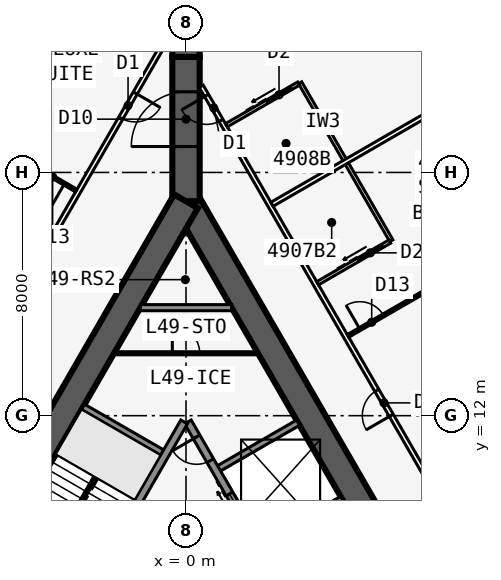
"""IFC4 building model, lengths in metres.
Left out: names, types, materials, properties, quantities, classifications, styles, units other than length and angle.
Written with IfcOpenShell. Run it as: python <this file> out.ifc"""

import sys

from ifc_helpers import new_model, si_unit, direction, frame, frame_2d, origin, place, context, subcontext, project, spatial, rectangle, extrude, element, fill, save


model = new_model("IFC4")
c1 = context("Model", 3, precision=1e-05, world=origin(), true_north=direction((0.0, 1.0)))
c2 = subcontext(c1, "Body", "Model", "MODEL_VIEW")
j1 = project(units=[si_unit("LENGTHUNIT", "METRE"), si_unit("PLANEANGLEUNIT", "RADIAN")], contexts=[c1])
p1 = place(None, origin())
s1 = spatial("IfcSite", under=j1, at=p1, CompositionType="ELEMENT")
p2 = place(p1, origin())
s2 = spatial("IfcBuilding", under=s1, at=p2, CompositionType="ELEMENT")
p3 = place(p2, frame((0.0, 0.0, 182.7)))
s3 = spatial("IfcBuildingStorey", under=s2, at=p3, CompositionType="ELEMENT", Elevation=182.7)
p4 = place(p3, frame((16.5, -9.526, 0.0), z_axis=(0.0, 0.0, 1.0), x_axis=(-0.499999749417, 0.866025548458, 0.0)))
e1 = element("IfcWall", 1, at=p4, inside=s3, PredefinedType="SHEAR", context=c2, shape_type="SweptSolid", body=[
    extrude(rectangle(XDim=33.0, YDim=0.9, at=frame_2d((16.5, 0.0))), origin(), (0.0, 0.0, 1.0), 3.4),
])
p5 = place(p4, frame((14.15, 0.0, 0.0)))
e2 = element("IfcOpeningElement", 2, at=p5, cuts=e1, PredefinedType="OPENING", context=c2, shape_type="SweptSolid", body=[
    extrude(rectangle(XDim=1.8, YDim=2.13, at=frame_2d((0.9, 1.065))), frame((0.0, 0.46, 0.0), z_axis=(0.0, -1.0, 0.0), x_axis=(1.0, 0.0, 0.0)), (0.0, 0.0, 1.0), 0.92),
])
p6 = place(p4, frame((12.6, 0.0, 0.0)))
e3 = element("IfcOpeningElement", 3, at=p6, cuts=e1, PredefinedType="OPENING", context=c2, shape_type="SweptSolid", body=[
    extrude(rectangle(XDim=1.0, YDim=2.13, at=frame_2d((0.5, 1.065))), frame((0.0, 0.46, 0.0), z_axis=(0.0, -1.0, 0.0), x_axis=(1.0, 0.0, 0.0)), (0.0, 0.0, 1.0), 0.92),
])
p7 = place(p3, frame((5.379, 2.586, 0.0), z_axis=(0.0, 0.0, 1.0), x_axis=(-0.500001375892, 0.866024609411, 0.0)))
e4 = element("IfcWall", 4, at=p7, inside=s3, PredefinedType="SOLIDWALL", context=c2, shape_type="SweptSolid", body=[
    extrude(rectangle(XDim=10.633, YDim=0.25, at=frame_2d((5.316, 0.0))), origin(), (0.0, 0.0, 1.0), 3.235),
])
p8 = place(p7, frame((9.164, 0.0, 0.0)))
e5 = element("IfcOpeningElement", 5, at=p8, cuts=e4, PredefinedType="OPENING", context=c2, shape_type="SweptSolid", body=[
    extrude(rectangle(XDim=0.9, YDim=2.13, at=frame_2d((0.45, 1.065))), frame((0.0, 0.135, 0.0), z_axis=(0.0, -1.0, 0.0), x_axis=(1.0, 0.0, 0.0)), (0.0, 0.0, 1.0), 0.27),
])
p9 = place(p7, frame((1.0, 0.0, 0.0)))
e6 = element("IfcOpeningElement", 6, at=p9, cuts=e4, PredefinedType="OPENING", context=c2, shape_type="SweptSolid", body=[
    extrude(rectangle(XDim=1.1, YDim=2.13, at=frame_2d((0.55, 1.065))), frame((0.0, 0.135, 0.0), z_axis=(0.0, -1.0, 0.0), x_axis=(1.0, 0.0, 0.0)), (0.0, 0.0, 1.0), 0.27),
])
p10 = place(p7, frame((3.9, 0.0, 0.0)))
e7 = element("IfcOpeningElement", 7, at=p10, cuts=e4, PredefinedType="OPENING", context=c2, shape_type="SweptSolid", body=[
    extrude(rectangle(XDim=1.1, YDim=2.13, at=frame_2d((0.55, 1.065))), frame((0.0, 0.135, 0.0), z_axis=(0.0, -1.0, 0.0), x_axis=(1.0, 0.0, 0.0)), (0.0, 0.0, 1.0), 0.27),
])
p11 = place(p7, frame((6.8, 0.0, 0.0)))
e8 = element("IfcOpeningElement", 8, at=p11, cuts=e4, PredefinedType="OPENING", context=c2, shape_type="SweptSolid", body=[
    extrude(rectangle(XDim=1.1, YDim=2.13, at=frame_2d((0.55, 1.065))), frame((0.0, 0.135, 0.0), z_axis=(0.0, -1.0, 0.0), x_axis=(1.0, 0.0, 0.0)), (0.0, 0.0, 1.0), 0.27),
])
for number, where, z_axis, x_axis in (
    (9, (2.429, 7.696, 0.0), (0.0, 0.0, 1.0), (0.866, 0.5, 0.0)),
    (10, (0.979, 10.207, 0.0), (0.0, 0.0, 1.0), (0.866, 0.5, 0.0)),
):
    element("IfcWall", number, at=place(p3, frame(where, z_axis=z_axis, x_axis=x_axis)), inside=s3, PredefinedType="SOLIDWALL", context=c2, shape_type="SweptSolid", body=[
        extrude(rectangle(XDim=3.125, YDim=0.2, at=frame_2d((1.562, 0.0))), origin(), (0.0, 0.0, 1.0), 3.235),
    ])
p12 = place(p3, frame((0.0, 19.052, 0.0), z_axis=(0.0, 0.0, 1.0), x_axis=(-0.499999749417, -0.866025548458, 0.0)))
e11 = element("IfcWall", 11, at=p12, inside=s3, PredefinedType="SHEAR", context=c2, shape_type="SweptSolid", body=[
    extrude(rectangle(XDim=33.0, YDim=0.9, at=frame_2d((16.5, 0.0))), origin(), (0.0, 0.0, 1.0), 3.4),
])
p13 = place(p12, frame((14.15, 0.0, 0.0)))
e12 = element("IfcOpeningElement", 12, at=p13, cuts=e11, PredefinedType="OPENING", context=c2, shape_type="SweptSolid", body=[
    extrude(rectangle(XDim=1.8, YDim=2.13, at=frame_2d((0.9, 1.065))), frame((0.0, 0.46, 0.0), z_axis=(0.0, -1.0, 0.0), x_axis=(1.0, 0.0, 0.0)), (0.0, 0.0, 1.0), 0.92),
])
p14 = place(p12, frame((12.6, 0.0, 0.0)))
e13 = element("IfcOpeningElement", 13, at=p14, cuts=e11, PredefinedType="OPENING", context=c2, shape_type="SweptSolid", body=[
    extrude(rectangle(XDim=1.0, YDim=2.13, at=frame_2d((0.5, 1.065))), frame((0.0, 0.46, 0.0), z_axis=(0.0, -1.0, 0.0), x_axis=(1.0, 0.0, 0.0)), (0.0, 0.0, 1.0), 0.92),
])
p15 = place(p3, frame((-0.062, 11.794, 0.0), z_axis=(0.0, 0.0, 1.0), x_axis=(-0.500006680225, -0.86602154692, 0.0)))
e14 = element("IfcWall", 14, at=p15, inside=s3, PredefinedType="SOLIDWALL", context=c2, shape_type="SweptSolid", body=[
    extrude(rectangle(XDim=7.733, YDim=0.25, at=frame_2d((3.866, 0.0))), origin(), (0.0, 0.0, 1.0), 3.235),
])
p16 = place(p3, frame((-0.679, 10.727, 0.0), z_axis=(0.0, 0.0, 1.0), x_axis=(-0.866022959057, 0.500004234368, 0.0)))
e15 = element("IfcWall", 15, at=p16, inside=s3, PredefinedType="SOLIDWALL", context=c2, shape_type="SweptSolid", body=[
    extrude(rectangle(XDim=3.125, YDim=0.2, at=frame_2d((1.562, 0.0))), origin(), (0.0, 0.0, 1.0), 3.235),
])
p17 = place(p3, frame((0.0, 19.052, 0.0), z_axis=(0.0, 0.0, 1.0), x_axis=(0.0, 1.0, 0.0)))
e16 = element("IfcWall", 16, at=p17, inside=s3, PredefinedType="SHEAR", context=c2, shape_type="SweptSolid", body=[
    extrude(rectangle(XDim=4.746, YDim=0.9, at=frame_2d((2.373, 0.0))), origin(), (0.0, 0.0, 1.0), 3.4),
])
p18 = place(p17, frame((1.8, 0.0, 0.0)))
e17 = element("IfcOpeningElement", 17, at=p18, cuts=e16, PredefinedType="OPENING", context=c2, shape_type="SweptSolid", body=[
    extrude(rectangle(XDim=1.8, YDim=2.13, at=frame_2d((0.9, 1.065))), frame((0.0, 0.46, 0.0), z_axis=(0.0, -1.0, 0.0), x_axis=(1.0, 0.0, 0.0)), (0.0, 0.0, 1.0), 0.92),
])
p19 = place(p3, frame((0.0, 23.799, 0.0), z_axis=(0.0, 0.0, 1.0), x_axis=(0.0, 1.0, 0.0)))
e18 = element("IfcWall", 18, at=p19, inside=s3, PredefinedType="SHEAR", context=c2, shape_type="SweptSolid", body=[
    extrude(rectangle(XDim=1.155, YDim=0.9, at=frame_2d((0.577, 0.0))), origin(), (0.0, 0.0, 1.0), 3.4),
])
p20 = place(p3, frame((9.471, 22.754, 0.0), z_axis=(0.0, 0.0, 1.0), x_axis=(-0.691719937936, 0.722165858693, 0.0)))
e19 = element("IfcWall", 19, at=p20, inside=s3, PredefinedType="STANDARD", context=c2, shape_type="SweptSolid", body=[
    extrude(rectangle(XDim=5.148, YDim=0.25, at=frame_2d((2.574, 0.0))), origin(), (0.0, 0.0, 1.0), 3.235),
])
p21 = place(p20, frame((0.774, 0.0, 0.45)))
e20 = element("IfcOpeningElement", 20, at=p21, cuts=e19, PredefinedType="OPENING", context=c2, shape_type="SweptSolid", body=[
    extrude(rectangle(XDim=3.6, YDim=2.4, at=frame_2d((1.8, 1.2))), frame((0.0, 0.135, 0.0), z_axis=(0.0, -1.0, 0.0), x_axis=(1.0, 0.0, 0.0)), (0.0, 0.0, 1.0), 0.27),
])
p22 = place(p3, frame((20.027, -10.985, 0.0), z_axis=(0.0, 0.0, 1.0), x_axis=(-0.500001677587, 0.866024435227, 0.0)))
e21 = element("IfcWall", 21, at=p22, inside=s3, PredefinedType="PARTITIONING", context=c2, shape_type="SweptSolid", body=[
    extrude(rectangle(XDim=39.054, YDim=0.15, at=frame_2d((19.527, 0.0))), origin(), (0.0, 0.0, 1.0), 3.235),
])
p23 = place(p22, frame((1.558, 0.0, 0.0)))
e22 = element("IfcOpeningElement", 22, at=p23, cuts=e21, PredefinedType="OPENING", context=c2, shape_type="SweptSolid", body=[
    extrude(rectangle(XDim=0.95, YDim=2.13, at=frame_2d((0.475, 1.065))), frame((0.0, 0.085, 0.0), z_axis=(0.0, -1.0, 0.0), x_axis=(1.0, 0.0, 0.0)), (0.0, 0.0, 1.0), 0.17),
])
p24 = place(p22, frame((12.752, 0.0, 0.0)))
e23 = element("IfcOpeningElement", 23, at=p24, cuts=e21, PredefinedType="OPENING", context=c2, shape_type="SweptSolid", body=[
    extrude(rectangle(XDim=0.95, YDim=2.13, at=frame_2d((0.475, 1.065))), frame((0.0, 0.085, 0.0), z_axis=(0.0, -1.0, 0.0), x_axis=(1.0, 0.0, 0.0)), (0.0, 0.0, 1.0), 0.17),
])
p25 = place(p22, frame((26.552, 0.0, 0.0)))
e24 = element("IfcOpeningElement", 24, at=p25, cuts=e21, PredefinedType="OPENING", context=c2, shape_type="SweptSolid", body=[
    extrude(rectangle(XDim=0.95, YDim=2.13, at=frame_2d((0.475, 1.065))), frame((0.0, 0.085, 0.0), z_axis=(0.0, -1.0, 0.0), x_axis=(1.0, 0.0, 0.0)), (0.0, 0.0, 1.0), 0.17),
])
p26 = place(p22, frame((37.752, 0.0, 0.0)))
e25 = element("IfcOpeningElement", 25, at=p26, cuts=e21, PredefinedType="OPENING", context=c2, shape_type="SweptSolid", body=[
    extrude(rectangle(XDim=0.95, YDim=2.13, at=frame_2d((0.475, 1.065))), frame((0.0, 0.085, 0.0), z_axis=(0.0, -1.0, 0.0), x_axis=(1.0, 0.0, 0.0)), (0.0, 0.0, 1.0), 0.17),
])
p27 = place(p3, frame((5.329, 14.623, 0.0), z_axis=(0.0, 0.0, 1.0), x_axis=(0.866011723728, 0.500023693804, 0.0)))
e26 = element("IfcWall", 26, at=p27, inside=s3, PredefinedType="PARTITIONING", context=c2, shape_type="SweptSolid", body=[
    extrude(rectangle(XDim=8.395, YDim=0.1, at=frame_2d((4.198, 0.0))), origin(), (0.0, 0.0, 1.0), 2.389),
])
p28 = place(p27, frame((0.45, 0.0, 0.0)))
e27 = element("IfcOpeningElement", 27, at=p28, cuts=e26, PredefinedType="OPENING", context=c2, shape_type="SweptSolid", body=[
    extrude(rectangle(XDim=0.9, YDim=2.13, at=frame_2d((0.45, 1.065))), frame((0.0, 0.06, 0.0), z_axis=(0.0, -1.0, 0.0), x_axis=(1.0, 0.0, 0.0)), (0.0, 0.0, 1.0), 0.12),
])
p29 = place(p3, frame((2.829, 18.954, 0.0), z_axis=(0.0, 0.0, 1.0), x_axis=(0.866015739374, 0.500016738876, 0.0)))
e28 = element("IfcWall", 28, at=p29, inside=s3, PredefinedType="PARTITIONING", context=c2, shape_type="SweptSolid", body=[
    extrude(rectangle(XDim=7.516, YDim=0.15, at=frame_2d((3.758, 0.0))), origin(), (0.0, 0.0, 1.0), 2.389),
])
p30 = place(p3, frame((6.753, 17.755, 0.0), z_axis=(0.0, 0.0, 1.0), x_axis=(-0.499990139034, 0.866031096941, 0.0)))
e29 = element("IfcWall", 29, at=p30, inside=s3, PredefinedType="PLUMBINGWALL", context=c2, shape_type="SweptSolid", body=[
    extrude(rectangle(XDim=3.0, YDim=0.12, at=frame_2d((1.5, 0.0))), origin(), (0.0, 0.0, 1.0), 3.235),
])
p31 = place(p3, frame((4.329, 16.355, 0.0), z_axis=(0.0, 0.0, 1.0), x_axis=(0.866035715982, 0.499982138324, 0.0)))
e30 = element("IfcWall", 30, at=p31, inside=s3, PredefinedType="PLUMBINGWALL", context=c2, shape_type="SweptSolid", body=[
    extrude(rectangle(XDim=2.74, YDim=0.12, at=frame_2d((1.37, 0.0))), origin(), (0.0, 0.0, 1.0), 3.235),
])
p32 = place(p31, frame((1.55, 0.0, 0.0)))
e31 = element("IfcOpeningElement", 31, at=p32, cuts=e30, PredefinedType="OPENING", context=c2, shape_type="SweptSolid", body=[
    extrude(rectangle(XDim=0.9, YDim=2.13, at=frame_2d((0.45, 1.065))), frame((0.0, 0.07, 0.0), z_axis=(0.0, -1.0, 0.0), x_axis=(1.0, 0.0, 0.0)), (0.0, 0.0, 1.0), 0.14),
])
p33 = place(p3, frame((5.253, 20.354, 0.0), z_axis=(0.0, 0.0, 1.0), x_axis=(-0.499990139034, 0.866031096941, 0.0)))
e32 = element("IfcWall", 32, at=p33, inside=s3, PredefinedType="PLUMBINGWALL", context=c2, shape_type="SweptSolid", body=[
    extrude(rectangle(XDim=3.0, YDim=0.12, at=frame_2d((1.5, 0.0))), origin(), (0.0, 0.0, 1.0), 3.235),
])
p34 = place(p3, frame((1.329, 21.552, 0.0), z_axis=(0.0, 0.0, 1.0), x_axis=(0.865997131366, 0.500048966069, 0.0)))
e33 = element("IfcWall", 33, at=p34, inside=s3, PredefinedType="PLUMBINGWALL", context=c2, shape_type="SweptSolid", body=[
    extrude(rectangle(XDim=2.74, YDim=0.12, at=frame_2d((1.37, 0.0))), origin(), (0.0, 0.0, 1.0), 3.235),
])
p35 = place(p34, frame((1.55, 0.0, 0.0)))
e34 = element("IfcOpeningElement", 34, at=p35, cuts=e33, PredefinedType="OPENING", context=c2, shape_type="SweptSolid", body=[
    extrude(rectangle(XDim=0.9, YDim=2.13, at=frame_2d((0.45, 1.065))), frame((0.0, 0.07, 0.0), z_axis=(0.0, -1.0, 0.0), x_axis=(1.0, 0.0, 0.0)), (0.0, 0.0, 1.0), 0.14),
])
p36 = place(p3, frame((-0.5, 24.636, 0.0), z_axis=(0.0, 0.0, 1.0), x_axis=(-0.500001915564, -0.86602429783, 0.0)))
e35 = element("IfcWall", 35, at=p36, inside=s3, PredefinedType="PARTITIONING", context=c2, shape_type="SweptSolid", body=[
    extrude(rectangle(XDim=42.172, YDim=0.15, at=frame_2d((21.086, 0.0))), origin(), (0.0, 0.0, 1.0), 3.235),
])
p37 = place(p36, frame((2.338, 0.0, 0.0)))
e36 = element("IfcOpeningElement", 36, at=p37, cuts=e35, PredefinedType="OPENING", context=c2, shape_type="SweptSolid", body=[
    extrude(rectangle(XDim=0.95, YDim=2.13, at=frame_2d((0.475, 1.065))), frame((0.0, 0.085, 0.0), z_axis=(0.0, -1.0, 0.0), x_axis=(1.0, 0.0, 0.0)), (0.0, 0.0, 1.0), 0.17),
])
p38 = place(p36, frame((18.111, 0.0, 0.0)))
e37 = element("IfcOpeningElement", 37, at=p38, cuts=e35, PredefinedType="OPENING", context=c2, shape_type="SweptSolid", body=[
    extrude(rectangle(XDim=0.95, YDim=2.13, at=frame_2d((0.475, 1.065))), frame((0.0, 0.085, 0.0), z_axis=(0.0, -1.0, 0.0), x_axis=(1.0, 0.0, 0.0)), (0.0, 0.0, 1.0), 0.17),
])
p39 = place(p36, frame((28.111, 0.0, 0.0)))
e38 = element("IfcOpeningElement", 38, at=p39, cuts=e35, PredefinedType="OPENING", context=c2, shape_type="SweptSolid", body=[
    extrude(rectangle(XDim=0.95, YDim=2.13, at=frame_2d((0.475, 1.065))), frame((0.0, 0.085, 0.0), z_axis=(0.0, -1.0, 0.0), x_axis=(1.0, 0.0, 0.0)), (0.0, 0.0, 1.0), 0.17),
])
p40 = place(p36, frame((39.311, 0.0, 0.0)))
e39 = element("IfcOpeningElement", 39, at=p40, cuts=e35, PredefinedType="OPENING", context=c2, shape_type="SweptSolid", body=[
    extrude(rectangle(XDim=0.95, YDim=2.13, at=frame_2d((0.475, 1.065))), frame((0.0, 0.085, 0.0), z_axis=(0.0, -1.0, 0.0), x_axis=(1.0, 0.0, 0.0)), (0.0, 0.0, 1.0), 0.17),
])
p41 = place(p3, frame((-3.608, 19.404, 0.0), z_axis=(0.0, 0.0, 1.0), x_axis=(-0.866015989873, 0.500016305018, 0.0)))
e40 = element("IfcWall", 40, at=p41, inside=s3, PredefinedType="PARTITIONING", context=c2, shape_type="SweptSolid", body=[
    extrude(rectangle(XDim=6.616, YDim=0.1, at=frame_2d((3.308, 0.0))), origin(), (0.0, 0.0, 1.0), 2.389),
])
p42 = place(p41, frame((0.45, 0.0, 0.0)))
e41 = element("IfcOpeningElement", 41, at=p42, cuts=e40, PredefinedType="OPENING", context=c2, shape_type="SweptSolid", body=[
    extrude(rectangle(XDim=0.9, YDim=2.13, at=frame_2d((0.45, 1.065))), frame((0.0, 0.06, 0.0), z_axis=(0.0, -1.0, 0.0), x_axis=(1.0, 0.0, 0.0)), (0.0, 0.0, 1.0), 0.12),
])
p43 = place(p3, frame((-1.501, 15.552, 0.0), z_axis=(0.0, 0.0, 1.0), x_axis=(1.0, 0.0, 0.0)))
e42 = element("IfcWall", 42, at=p43, inside=s3, PredefinedType="SOLIDWALL", context=c2, shape_type="SweptSolid", body=[
    extrude(rectangle(XDim=3.002, YDim=0.2, at=frame_2d((1.501, 0.0))), origin(), (0.0, 0.0, 1.0), 3.235),
])
p44 = place(p3, frame((-2.367, 14.052, 0.0), z_axis=(0.0, 0.0, 1.0), x_axis=(1.0, 0.0, 0.0)))
e43 = element("IfcWall", 43, at=p44, inside=s3, PredefinedType="PARTITIONING", context=c2, shape_type="SweptSolid", body=[
    extrude(rectangle(XDim=4.734, YDim=0.1, at=frame_2d((2.367, 0.0))), origin(), (0.0, 0.0, 1.0), 3.235),
])
p45 = place(p44, frame((1.917, 0.0, 0.0)))
e44 = element("IfcOpeningElement", 44, at=p45, cuts=e43, PredefinedType="OPENING", context=c2, shape_type="SweptSolid", body=[
    extrude(rectangle(XDim=0.9, YDim=2.13, at=frame_2d((0.45, 1.065))), frame((0.0, 0.06, 0.0), z_axis=(0.0, -1.0, 0.0), x_axis=(1.0, 0.0, 0.0)), (0.0, 0.0, 1.0), 0.12),
])
p46 = place(p3, frame((-2.988, 9.978, 0.0), z_axis=(0.0, 0.0, 1.0), x_axis=(-0.499992232847, -0.866029888106, 0.0)))
e45 = element("IfcWall", 45, at=p46, inside=s3, PredefinedType="SOLIDWALL", context=c2, shape_type="SweptSolid", body=[
    extrude(rectangle(XDim=2.794, YDim=0.1, at=frame_2d((1.397, 0.0))), origin(), (0.0, 0.0, 1.0), 3.4),
])
p47 = place(p21, origin())
e46 = element("IfcWindow", 46, at=p47, inside=s3, PartitioningType="SINGLE_PANEL", PredefinedType="WINDOW", context=c2, shape_type="SweptSolid", body=[
    extrude(rectangle(XDim=3.6, YDim=2.4, at=frame_2d((1.8, 1.2))), frame((0.0, 0.03, 0.0), z_axis=(0.0, -1.0, 0.0), x_axis=(1.0, 0.0, 0.0)), (0.0, 0.0, 1.0), 0.06),
])
fill(e20, e46)
p48 = place(p28, origin())
e47 = element("IfcDoor", 47, at=p48, inside=s3, OperationType="SINGLE_SWING_LEFT", PredefinedType="DOOR", context=c2, shape_type="SweptSolid", body=[
    extrude(rectangle(XDim=0.9, YDim=2.13, at=frame_2d((0.45, 1.065))), frame((0.0, 0.025, 0.0), z_axis=(0.0, -1.0, 0.0), x_axis=(1.0, 0.0, 0.0)), (0.0, 0.0, 1.0), 0.05),
])
fill(e27, e47)
p49 = place(p25, origin())
e48 = element("IfcDoor", 48, at=p49, inside=s3, OperationType="SINGLE_SWING_LEFT", PredefinedType="DOOR", context=c2, shape_type="SweptSolid", body=[
    extrude(rectangle(XDim=0.95, YDim=2.13, at=frame_2d((0.475, 1.065))), frame((0.0, 0.025, 0.0), z_axis=(0.0, -1.0, 0.0), x_axis=(1.0, 0.0, 0.0)), (0.0, 0.0, 1.0), 0.05),
])
fill(e24, e48)
p50 = place(p32, origin())
e49 = element("IfcDoor", 49, at=p50, inside=s3, OperationType="SLIDING_TO_LEFT", PredefinedType="DOOR", context=c2, shape_type="SweptSolid", body=[
    extrude(rectangle(XDim=0.9, YDim=2.13, at=frame_2d((0.45, 1.065))), frame((0.0, 0.025, 0.0), z_axis=(0.0, -1.0, 0.0), x_axis=(1.0, 0.0, 0.0)), (0.0, 0.0, 1.0), 0.05),
])
fill(e31, e49)
p51 = place(p35, origin())
e50 = element("IfcDoor", 50, at=p51, inside=s3, OperationType="SLIDING_TO_LEFT", PredefinedType="DOOR", context=c2, shape_type="SweptSolid", body=[
    extrude(rectangle(XDim=0.9, YDim=2.13, at=frame_2d((0.45, 1.065))), frame((0.0, 0.025, 0.0), z_axis=(0.0, -1.0, 0.0), x_axis=(1.0, 0.0, 0.0)), (0.0, 0.0, 1.0), 0.05),
])
fill(e34, e50)
p52 = place(p26, origin())
e51 = element("IfcDoor", 51, at=p52, inside=s3, OperationType="SINGLE_SWING_RIGHT", PredefinedType="DOOR", context=c2, shape_type="SweptSolid", body=[
    extrude(rectangle(XDim=0.95, YDim=2.13, at=frame_2d((0.475, 1.065))), frame((0.0, 0.025, 0.0), z_axis=(0.0, -1.0, 0.0), x_axis=(1.0, 0.0, 0.0)), (0.0, 0.0, 1.0), 0.05),
])
fill(e25, e51)
p53 = place(p42, origin())
e52 = element("IfcDoor", 52, at=p53, inside=s3, OperationType="SINGLE_SWING_LEFT", PredefinedType="DOOR", context=c2, shape_type="SweptSolid", body=[
    extrude(rectangle(XDim=0.9, YDim=2.13, at=frame_2d((0.45, 1.065))), frame((0.0, 0.025, 0.0), z_axis=(0.0, -1.0, 0.0), x_axis=(1.0, 0.0, 0.0)), (0.0, 0.0, 1.0), 0.05),
])
fill(e41, e52)
p54 = place(p37, origin())
e53 = element("IfcDoor", 53, at=p54, inside=s3, OperationType="SINGLE_SWING_LEFT", PredefinedType="DOOR", context=c2, shape_type="SweptSolid", body=[
    extrude(rectangle(XDim=0.95, YDim=2.13, at=frame_2d((0.475, 1.065))), frame((0.0, 0.025, 0.0), z_axis=(0.0, -1.0, 0.0), x_axis=(1.0, 0.0, 0.0)), (0.0, 0.0, 1.0), 0.05),
])
fill(e36, e53)
p55 = place(p18, origin())
e54 = element("IfcDoor", 54, at=p55, inside=s3, OperationType="DOUBLE_DOOR_DOUBLE_SWING", PredefinedType="DOOR", context=c2, shape_type="SweptSolid", body=[
    extrude(rectangle(XDim=1.8, YDim=2.13, at=frame_2d((0.9, 1.065))), frame((0.0, 0.025, 0.0), z_axis=(0.0, -1.0, 0.0), x_axis=(1.0, 0.0, 0.0)), (0.0, 0.0, 1.0), 0.05),
])
fill(e17, e54)
p56 = place(p45, origin())
e55 = element("IfcDoor", 55, at=p56, inside=s3, OperationType="SINGLE_SWING_LEFT", PredefinedType="DOOR", context=c2, shape_type="SweptSolid", body=[
    extrude(rectangle(XDim=0.9, YDim=2.13, at=frame_2d((0.45, 1.065))), frame((0.0, 0.025, 0.0), z_axis=(0.0, -1.0, 0.0), x_axis=(1.0, 0.0, 0.0)), (0.0, 0.0, 1.0), 0.05),
])
fill(e44, e55)
p57 = place(p8, origin())
e56 = element("IfcDoor", 56, at=p57, inside=s3, OperationType="SINGLE_SWING_RIGHT", PredefinedType="DOOR", context=c2, shape_type="SweptSolid", body=[
    extrude(rectangle(XDim=0.9, YDim=2.13, at=frame_2d((0.45, 1.065))), frame((0.0, 0.025, 0.0), z_axis=(0.0, -1.0, 0.0), x_axis=(1.0, 0.0, 0.0)), (0.0, 0.0, 1.0), 0.05),
])
fill(e5, e56)
p58 = place(p11, origin())
e57 = element("IfcDoor", 57, at=p58, inside=s3, OperationType="DOUBLE_DOOR_SLIDING", PredefinedType="USERDEFINED", context=c2, shape_type="SweptSolid", body=[
    extrude(rectangle(XDim=1.1, YDim=2.13, at=frame_2d((0.55, 1.065))), frame((0.0, 0.025, 0.0), z_axis=(0.0, -1.0, 0.0), x_axis=(1.0, 0.0, 0.0)), (0.0, 0.0, 1.0), 0.05),
])
fill(e8, e57)
save(model, sys.argv[1])
